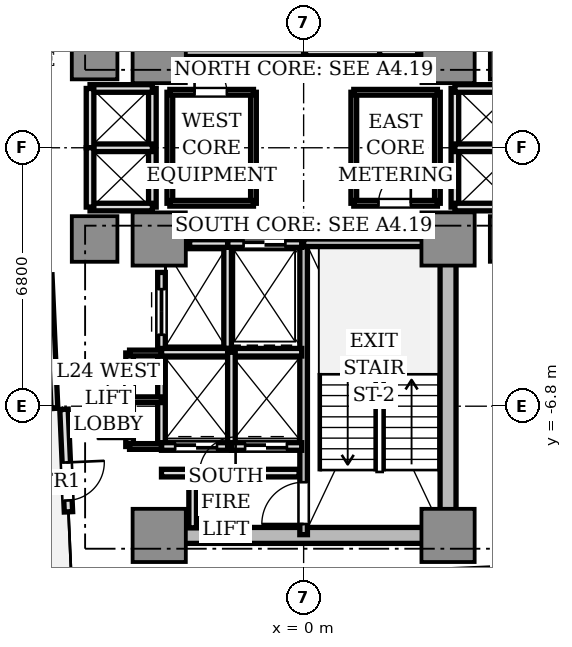
"""IFC4 building model, lengths in metres.
Left out: names, types, materials, properties, quantities, classifications, styles, units other than length and angle.
Written with IfcOpenShell. Run it as: python <this file> out.ifc"""

import sys

from ifc_helpers import new_model, si_unit, direction, frame, frame_2d, origin, origin_2d, place, context, subcontext, project, spatial, rectangle, extrude, source, transform, mapped, element, fill, save


model = new_model("IFC4")
c1 = context("Model", 3, precision=1e-05, world=origin(), true_north=direction((0.0, 1.0)))
c2 = subcontext(c1, "Body", "Model", "MODEL_VIEW")
j1 = project(units=[si_unit("LENGTHUNIT", "METRE"), si_unit("PLANEANGLEUNIT", "RADIAN")], contexts=[c1])
p1 = place(None, origin())
s1 = spatial("IfcSite", under=j1, at=p1, CompositionType="ELEMENT")
p2 = place(p1, origin())
s2 = spatial("IfcBuilding", under=s1, at=p2, CompositionType="ELEMENT")
p3 = place(p2, frame((0.0, 0.0, 90.2)))
s3 = spatial("IfcBuildingStorey", under=s2, at=p3, CompositionType="ELEMENT", Elevation=90.2)
p4 = place(p3, frame((-3.55, -10.2, 0.0), z_axis=(0.0, 0.0, 1.0), x_axis=(1.0, 0.0, 0.0)))
e1 = element("IfcWall", 1, at=p4, inside=s3, PredefinedType="SHEAR", context=c2, shape_type="SweptSolid", body=[
    extrude(rectangle(XDim=7.1, YDim=0.42, at=frame_2d((3.55, 0.0))), origin(), (0.0, 0.0, 1.0), 3.11),
])
p5 = place(p3, frame((3.8, -9.75, 0.0), z_axis=(0.0, 0.0, 1.0), x_axis=(0.0, 1.0, 0.0)))
e2 = element("IfcWall", 2, at=p5, inside=s3, PredefinedType="SHEAR", context=c2, shape_type="SweptSolid", body=[
    extrude(rectangle(XDim=6.9, YDim=0.42, at=frame_2d((3.45, 0.0))), origin(), (0.0, 0.0, 1.0), 3.11),
])
m1 = source(origin(), c2, "Body", "SweptSolid", [
    extrude(rectangle(XDim=1.4, YDim=1.4, at=origin_2d()), origin(), (0.0, 0.0, 1.0), 3.11),
])
for number, where, z_axis, x_axis in (
    (3, (-3.8, 2.4, 0.0), (0.0, 0.0, 1.0), (1.0, 0.0, 0.0)),
    (4, (3.8, 2.4, 0.0), (0.0, 0.0, 1.0), (1.0, 0.0, 0.0)),
    (5, (-3.8, -2.4, 0.0), (0.0, 0.0, 1.0), (1.0, 0.0, 0.0)),
    (6, (3.8, -2.4, 0.0), (0.0, 0.0, 1.0), (1.0, 0.0, 0.0)),
    (7, (-3.8, -10.2, 0.0), (0.0, 0.0, 1.0), (1.0, 0.0, 0.0)),
    (8, (3.8, -10.2, 0.0), (0.0, 0.0, 1.0), (1.0, 0.0, 0.0)),
):
    element("IfcColumn", number, at=place(p3, frame(where, z_axis=z_axis, x_axis=x_axis)), inside=s3, PredefinedType="COLUMN", context=c2, shape_type="MappedRepresentation", body=[
        mapped(m1, transform((0.0, 0.0, 0.0), scale=1.0)),
    ])
m2 = source(origin(), c2, "Body", "SweptSolid", [
    extrude(rectangle(XDim=1.2, YDim=1.2, at=origin_2d()), origin(), (0.0, 0.0, 1.0), 3.11),
])
for number, where, z_axis, x_axis in (
    (9, (5.5, 2.4, 0.0), (0.0, 0.0, 1.0), (1.0, 0.0, 0.0)),
    (10, (-5.5, 2.4, 0.0), (0.0, 0.0, 1.0), (1.0, 0.0, 0.0)),
    (11, (5.5, -2.4, 0.0), (0.0, 0.0, 1.0), (1.0, 0.0, 0.0)),
    (12, (-5.5, -2.4, 0.0), (0.0, 0.0, 1.0), (1.0, 0.0, 0.0)),
):
    element("IfcColumn", number, at=place(p3, frame(where, z_axis=z_axis, x_axis=x_axis)), inside=s3, PredefinedType="COLUMN", context=c2, shape_type="MappedRepresentation", body=[
        mapped(m2, transform((0.0, 0.0, 0.0), scale=1.0)),
    ])
p6 = place(p3, frame((-6.306, -6.882, 0.0), z_axis=(0.0, 0.0, 1.0), x_axis=(0.043672655174, -0.999045894436, 0.0)))
e13 = element("IfcWall", 13, at=p6, inside=s3, PredefinedType="STANDARD", context=c2, shape_type="SweptSolid", body=[
    extrude(rectangle(XDim=2.7, YDim=0.22, at=frame_2d((1.35, 0.0))), origin(), (0.0, 0.0, 1.0), 3.11),
])
p7 = place(p6, frame((1.4, 0.0, 0.0)))
e14 = element("IfcOpeningElement", 14, at=p7, cuts=e13, PredefinedType="OPENING", context=c2, shape_type="SweptSolid", body=[
    extrude(rectangle(XDim=1.0, YDim=2.2, at=frame_2d((0.5, 1.1))), frame((0.0, 0.12, 0.0), z_axis=(0.0, -1.0, 0.0), x_axis=(1.0, 0.0, 0.0)), (0.0, 0.0, 1.0), 0.24),
])
p8 = place(p3, frame((0.0, 2.5, 0.0), z_axis=(0.0, 0.0, 1.0), x_axis=(0.0, 1.0, 0.0)))
e15 = element("IfcWall", 15, at=p8, inside=s3, PredefinedType="SOLIDWALL", context=c2, shape_type="SweptSolid", body=[
    extrude(rectangle(XDim=7.68, YDim=0.2, at=frame_2d((3.84, 0.0))), origin(), (0.0, 0.0, 1.0), 3.11),
])
p9 = place(p8, frame((6.36, 0.0, 0.0)))
e16 = element("IfcOpeningElement", 16, at=p9, cuts=e15, PredefinedType="OPENING", context=c2, shape_type="SweptSolid", body=[
    extrude(rectangle(XDim=1.1, YDim=2.15, at=frame_2d((0.55, 1.075))), frame((0.0, 0.11, 0.0), z_axis=(0.0, -1.0, 0.0), x_axis=(1.0, 0.0, 0.0)), (0.0, 0.0, 1.0), 0.22),
])
p10 = place(p3, frame((-3.72, 2.5, 0.0), z_axis=(0.0, 0.0, 1.0), x_axis=(1.0, 0.0, 0.0)))
e17 = element("IfcWall", 17, at=p10, inside=s3, PredefinedType="SOLIDWALL", context=c2, shape_type="SweptSolid", body=[
    extrude(rectangle(XDim=3.72, YDim=0.2, at=frame_2d((1.86, 0.0))), origin(), (0.0, 0.0, 1.0), 3.11),
])
p11 = place(p3, frame((0.0, -10.18, 0.0), z_axis=(0.0, 0.0, 1.0), x_axis=(0.0, 1.0, 0.0)))
e18 = element("IfcWall", 18, at=p11, inside=s3, PredefinedType="SOLIDWALL", context=c2, shape_type="SweptSolid", body=[
    extrude(rectangle(XDim=7.68, YDim=0.2, at=frame_2d((3.84, 0.0))), origin(), (0.0, 0.0, 1.0), 3.11),
])
p12 = place(p11, frame((0.28, 0.0, 0.0)))
e19 = element("IfcOpeningElement", 19, at=p12, cuts=e18, PredefinedType="OPENING", context=c2, shape_type="SweptSolid", body=[
    extrude(rectangle(XDim=1.1, YDim=2.15, at=frame_2d((0.55, 1.075))), frame((0.0, 0.11, 0.0), z_axis=(0.0, -1.0, 0.0), x_axis=(1.0, 0.0, 0.0)), (0.0, 0.0, 1.0), 0.22),
])
p13 = place(p3, frame((0.0, -2.5, 0.0), z_axis=(0.0, 0.0, 1.0), x_axis=(1.0, 0.0, 0.0)))
e20 = element("IfcWall", 20, at=p13, inside=s3, PredefinedType="SOLIDWALL", context=c2, shape_type="SweptSolid", body=[
    extrude(rectangle(XDim=3.72, YDim=0.2, at=frame_2d((1.86, 0.0))), origin(), (0.0, 0.0, 1.0), 3.11),
])
p14 = place(p3, frame((2.0, 2.5, 0.0), z_axis=(0.0, 0.0, 1.0), x_axis=(0.0, 1.0, 0.0)))
e21 = element("IfcWall", 21, at=p14, inside=s3, PredefinedType="SOLIDWALL", context=c2, shape_type="SweptSolid", body=[
    extrude(rectangle(XDim=2.78, YDim=0.2, at=frame_2d((1.39, 0.0))), origin(), (0.0, 0.0, 1.0), 2.66),
])
p15 = place(p3, frame((0.05, 2.52, 0.0), z_axis=(0.0, 0.0, 1.0), x_axis=(1.0, 0.0, 0.0)))
e22 = element("IfcWall", 22, at=p15, inside=s3, PredefinedType="SOLIDWALL", context=c2, shape_type="SweptSolid", body=[
    extrude(rectangle(XDim=1.95, YDim=0.2, at=frame_2d((0.975, 0.0))), origin(), (0.0, 0.0, 1.0), 2.66),
])
p16 = place(p3, frame((-2.0, -5.28, 0.0), z_axis=(0.0, 0.0, 1.0), x_axis=(0.0, 1.0, 0.0)))
e23 = element("IfcWall", 23, at=p16, inside=s3, PredefinedType="SOLIDWALL", context=c2, shape_type="SweptSolid", body=[
    extrude(rectangle(XDim=2.78, YDim=0.2, at=frame_2d((1.39, 0.0))), origin(), (0.0, 0.0, 1.0), 2.66),
])
p17 = place(p3, frame((-2.0, -2.52, 0.0), z_axis=(0.0, 0.0, 1.0), x_axis=(1.0, 0.0, 0.0)))
e24 = element("IfcWall", 24, at=p17, inside=s3, PredefinedType="SOLIDWALL", context=c2, shape_type="SweptSolid", body=[
    extrude(rectangle(XDim=1.95, YDim=0.2, at=frame_2d((0.975, 0.0))), origin(), (0.0, 0.0, 1.0), 2.66),
])
p18 = place(p17, frame((0.42, 0.0, 0.0)))
e25 = element("IfcOpeningElement", 25, at=p18, cuts=e24, PredefinedType="OPENING", context=c2, shape_type="SweptSolid", body=[
    extrude(rectangle(XDim=1.1, YDim=2.2, at=frame_2d((0.55, 1.1))), frame((0.0, 0.11, 0.0), z_axis=(0.0, -1.0, 0.0), x_axis=(1.0, 0.0, 0.0)), (0.0, 0.0, 1.0), 0.22),
])
for number, where, z_axis, x_axis in (
    (26, (2.0, 2.52, 0.0), (0.0, 0.0, 1.0), (1.0, 0.0, 0.0)),
    (27, (-3.0, -2.52, 0.0), (0.0, 0.0, 1.0), (1.0, 0.0, 0.0)),
):
    element("IfcWall", number, at=place(p3, frame(where, z_axis=z_axis, x_axis=x_axis)), inside=s3, PredefinedType="SOLIDWALL", context=c2, shape_type="SweptSolid", body=[
        extrude(rectangle(XDim=1.0, YDim=0.2, at=frame_2d((0.5, 0.0))), origin(), (0.0, 0.0, 1.0), 2.66),
    ])
p19 = place(p3, frame((-3.74, -5.36, 0.0), z_axis=(0.0, 0.0, 1.0), x_axis=(0.0, 1.0, 0.0)))
e28 = element("IfcWall", 28, at=p19, inside=s3, PredefinedType="SOLIDWALL", context=c2, shape_type="SweptSolid", body=[
    extrude(rectangle(XDim=2.08, YDim=0.2, at=frame_2d((1.04, 0.0))), origin(), (0.0, 0.0, 1.0), 2.66),
])
p20 = place(p19, frame((0.44, 0.0, 0.0)))
e29 = element("IfcOpeningElement", 29, at=p20, cuts=e28, PredefinedType="OPENING", context=c2, shape_type="SweptSolid", body=[
    extrude(rectangle(XDim=1.2, YDim=2.2, at=frame_2d((0.6, 1.1))), frame((0.0, 0.11, 0.0), z_axis=(0.0, -1.0, 0.0), x_axis=(1.0, 0.0, 0.0)), (0.0, 0.0, 1.0), 0.22),
])
p21 = place(p3, frame((-3.74, -7.86, 0.0), z_axis=(0.0, 0.0, 1.0), x_axis=(0.0, 1.0, 0.0)))
e30 = element("IfcWall", 30, at=p21, inside=s3, PredefinedType="SOLIDWALL", context=c2, shape_type="SweptSolid", body=[
    extrude(rectangle(XDim=2.48, YDim=0.2, at=frame_2d((1.24, 0.0))), origin(), (0.0, 0.0, 1.0), 2.66),
])
p22 = place(p3, frame((-3.74, -7.86, 0.0), z_axis=(0.0, 0.0, 1.0), x_axis=(1.0, 0.0, 0.0)))
e31 = element("IfcWall", 31, at=p22, inside=s3, PredefinedType="SOLIDWALL", context=c2, shape_type="SweptSolid", body=[
    extrude(rectangle(XDim=1.84, YDim=0.2, at=frame_2d((0.92, 0.0))), origin(), (0.0, 0.0, 1.0), 2.66),
])
p23 = place(p22, frame((0.36, 0.0, 0.0)))
e32 = element("IfcOpeningElement", 32, at=p23, cuts=e31, PredefinedType="OPENING", context=c2, shape_type="SweptSolid", body=[
    extrude(rectangle(XDim=1.1, YDim=2.2, at=frame_2d((0.55, 1.1))), frame((0.0, 0.11, 0.0), z_axis=(0.0, -1.0, 0.0), x_axis=(1.0, 0.0, 0.0)), (0.0, 0.0, 1.0), 0.22),
])
p24 = place(p3, frame((-3.74, -5.38, 0.0), z_axis=(0.0, 0.0, 1.0), x_axis=(1.0, 0.0, 0.0)))
e33 = element("IfcWall", 33, at=p24, inside=s3, PredefinedType="SOLIDWALL", context=c2, shape_type="SweptSolid", body=[
    extrude(rectangle(XDim=3.69, YDim=0.2, at=frame_2d((1.845, 0.0))), origin(), (0.0, 0.0, 1.0), 2.66),
])
p25 = place(p3, frame((-1.9, -7.86, 0.0), z_axis=(0.0, 0.0, 1.0), x_axis=(0.0, 1.0, 0.0)))
e34 = element("IfcWall", 34, at=p25, inside=s3, PredefinedType="SOLIDWALL", context=c2, shape_type="SweptSolid", body=[
    extrude(rectangle(XDim=2.48, YDim=0.2, at=frame_2d((1.24, 0.0))), origin(), (0.0, 0.0, 1.0), 2.66),
])
p26 = place(p3, frame((-1.9, -7.86, 0.0), z_axis=(0.0, 0.0, 1.0), x_axis=(1.0, 0.0, 0.0)))
e35 = element("IfcWall", 35, at=p26, inside=s3, PredefinedType="SOLIDWALL", context=c2, shape_type="SweptSolid", body=[
    extrude(rectangle(XDim=1.85, YDim=0.2, at=frame_2d((0.925, 0.0))), origin(), (0.0, 0.0, 1.0), 2.66),
])
p27 = place(p26, frame((0.36, 0.0, 0.0)))
e36 = element("IfcOpeningElement", 36, at=p27, cuts=e35, PredefinedType="OPENING", context=c2, shape_type="SweptSolid", body=[
    extrude(rectangle(XDim=1.1, YDim=2.2, at=frame_2d((0.55, 1.1))), frame((0.0, 0.11, 0.0), z_axis=(0.0, -1.0, 0.0), x_axis=(1.0, 0.0, 0.0)), (0.0, 0.0, 1.0), 0.22),
])
p28 = place(p3, frame((3.98, -1.56, 0.0), z_axis=(0.0, 0.0, 1.0), x_axis=(0.0, 1.0, 0.0)))
e37 = element("IfcWall", 37, at=p28, inside=s3, PredefinedType="SOLIDWALL", context=c2, shape_type="SweptSolid", body=[
    extrude(rectangle(XDim=3.12, YDim=0.2, at=frame_2d((1.56, 0.0))), origin(), (0.0, 0.0, 1.0), 2.28),
])
for number, where, z_axis, x_axis in (
    (38, (3.98, 1.56, 0.0), (0.0, 0.0, 1.0), (1.0, 0.0, 0.0)),
    (39, (3.98, -1.56, 0.0), (0.0, 0.0, 1.0), (1.0, 0.0, 0.0)),
    (40, (3.98, 0.0, 0.0), (0.0, 0.0, 1.0), (1.0, 0.0, 0.0)),
):
    element("IfcWall", number, at=place(p3, frame(where, z_axis=z_axis, x_axis=x_axis)), inside=s3, PredefinedType="SOLIDWALL", context=c2, shape_type="SweptSolid", body=[
        extrude(rectangle(XDim=1.64, YDim=0.2, at=frame_2d((0.82, 0.0))), origin(), (0.0, 0.0, 1.0), 2.66),
    ])
p29 = place(p3, frame((-3.98, -1.56, 0.0), z_axis=(0.0, 0.0, 1.0), x_axis=(0.0, 1.0, 0.0)))
e41 = element("IfcWall", 41, at=p29, inside=s3, PredefinedType="SOLIDWALL", context=c2, shape_type="SweptSolid", body=[
    extrude(rectangle(XDim=3.12, YDim=0.2, at=frame_2d((1.56, 0.0))), origin(), (0.0, 0.0, 1.0), 2.28),
])
for number, where, z_axis, x_axis in (
    (42, (-5.62, 1.56, 0.0), (0.0, 0.0, 1.0), (1.0, 0.0, 0.0)),
    (43, (-5.62, -1.56, 0.0), (0.0, 0.0, 1.0), (1.0, 0.0, 0.0)),
    (44, (-5.62, 0.0, 0.0), (0.0, 0.0, 1.0), (1.0, 0.0, 0.0)),
):
    element("IfcWall", number, at=place(p3, frame(where, z_axis=z_axis, x_axis=x_axis)), inside=s3, PredefinedType="SOLIDWALL", context=c2, shape_type="SweptSolid", body=[
        extrude(rectangle(XDim=1.64, YDim=0.2, at=frame_2d((0.82, 0.0))), origin(), (0.0, 0.0, 1.0), 2.66),
    ])
for number, where, z_axis, x_axis in (
    (45, (-5.62, 0.0, 0.0), (0.0, 0.0, 1.0), (0.0, 1.0, 0.0)),
    (46, (-5.62, -1.56, 0.0), (0.0, 0.0, 1.0), (0.0, 1.0, 0.0)),
):
    element("IfcWall", number, at=place(p3, frame(where, z_axis=z_axis, x_axis=x_axis)), inside=s3, PredefinedType="SOLIDWALL", context=c2, shape_type="SweptSolid", body=[
        extrude(rectangle(XDim=1.56, YDim=0.2, at=frame_2d((0.78, 0.0))), origin(), (0.0, 0.0, 1.0), 2.66),
    ])
p30 = place(p3, frame((-3.74, -8.56, 0.0), z_axis=(0.0, 0.0, 1.0), x_axis=(1.0, 0.0, 0.0)))
e47 = element("IfcWall", 47, at=p30, inside=s3, PredefinedType="SOLIDWALL", context=c2, shape_type="SweptSolid", body=[
    extrude(rectangle(XDim=3.62, YDim=0.2, at=frame_2d((1.81, 0.0))), origin(), (0.0, 0.0, 1.0), 2.66),
])
p31 = place(p30, frame((1.0, 0.0, 0.0)))
e48 = element("IfcOpeningElement", 48, at=p31, cuts=e47, PredefinedType="OPENING", context=c2, shape_type="SweptSolid", body=[
    extrude(rectangle(XDim=0.95, YDim=2.15, at=frame_2d((0.475, 1.075))), frame((0.0, 0.11, 0.0), z_axis=(0.0, -1.0, 0.0), x_axis=(1.0, 0.0, 0.0)), (0.0, 0.0, 1.0), 0.22),
])
p32 = place(p3, frame((-2.92, -10.0, 0.0), z_axis=(0.0, 0.0, 1.0), x_axis=(0.0, 1.0, 0.0)))
e49 = element("IfcWall", 49, at=p32, inside=s3, PredefinedType="SOLIDWALL", context=c2, shape_type="SweptSolid", body=[
    extrude(rectangle(XDim=1.44, YDim=0.2, at=frame_2d((0.72, 0.0))), origin(), (0.0, 0.0, 1.0), 2.66),
])
p33 = place(p3, frame((-4.58, -7.86, 0.0), z_axis=(0.0, 0.0, 1.0), x_axis=(0.0, 1.0, 0.0)))
e50 = element("IfcWall", 50, at=p33, inside=s3, PredefinedType="SOLIDWALL", context=c2, shape_type="SweptSolid", body=[
    extrude(rectangle(XDim=2.46, YDim=0.2, at=frame_2d((1.23, 0.0))), origin(), (0.0, 0.0, 1.0), 2.66),
])
p34 = place(p33, frame((0.2, 0.0, 0.0)))
e51 = element("IfcOpeningElement", 51, at=p34, cuts=e50, PredefinedType="OPENING", context=c2, shape_type="SweptSolid", body=[
    extrude(rectangle(XDim=0.85, YDim=2.1, at=frame_2d((0.425, 1.05))), frame((0.0, 0.11, 0.0), z_axis=(0.0, -1.0, 0.0), x_axis=(1.0, 0.0, 0.0)), (0.0, 0.0, 1.0), 0.22),
])
p35 = place(p33, frame((1.38, 0.0, 0.0)))
e52 = element("IfcOpeningElement", 52, at=p35, cuts=e50, PredefinedType="OPENING", context=c2, shape_type="SweptSolid", body=[
    extrude(rectangle(XDim=0.85, YDim=2.1, at=frame_2d((0.425, 1.05))), frame((0.0, 0.11, 0.0), z_axis=(0.0, -1.0, 0.0), x_axis=(1.0, 0.0, 0.0)), (0.0, 0.0, 1.0), 0.22),
])
for number, where, z_axis, x_axis in (
    (53, (-4.58, -5.4, 0.0), (0.0, 0.0, 1.0), (1.0, 0.0, 0.0)),
    (54, (-4.58, -7.86, 0.0), (0.0, 0.0, 1.0), (1.0, 0.0, 0.0)),
    (55, (-4.58, -6.63, 0.0), (0.0, 0.0, 1.0), (1.0, 0.0, 0.0)),
):
    element("IfcWall", number, at=place(p3, frame(where, z_axis=z_axis, x_axis=x_axis)), inside=s3, PredefinedType="PARTITIONING", context=c2, shape_type="SweptSolid", body=[
        extrude(rectangle(XDim=0.84, YDim=0.15, at=frame_2d((0.42, 0.0))), origin(), (0.0, 0.0, 1.0), 2.66),
    ])
p36 = place(p3, frame((-1.32, -1.46, 0.0), z_axis=(0.0, 0.0, 1.0), x_axis=(0.0, 1.0, 0.0)))
e56 = element("IfcWall", 56, at=p36, inside=s3, PredefinedType="PARTITIONING", context=c2, shape_type="SweptSolid", body=[
    extrude(rectangle(XDim=2.92, YDim=0.15, at=frame_2d((1.46, 0.0))), origin(), (0.0, 0.0, 1.0), 2.66),
])
p37 = place(p3, frame((-3.52, -1.46, 0.0), z_axis=(0.0, 0.0, 1.0), x_axis=(0.0, 1.0, 0.0)))
e57 = element("IfcWall", 57, at=p37, inside=s3, PredefinedType="PARTITIONING", context=c2, shape_type="SweptSolid", body=[
    extrude(rectangle(XDim=2.92, YDim=0.15, at=frame_2d((1.46, 0.0))), origin(), (0.0, 0.0, 1.0), 2.28),
])
p38 = place(p3, frame((-3.52, 1.46, 0.0), z_axis=(0.0, 0.0, 1.0), x_axis=(1.0, 0.0, 0.0)))
e58 = element("IfcWall", 58, at=p38, inside=s3, PredefinedType="PARTITIONING", context=c2, shape_type="SweptSolid", body=[
    extrude(rectangle(XDim=2.2, YDim=0.15, at=frame_2d((1.1, 0.0))), origin(), (0.0, 0.0, 1.0), 2.66),
])
p39 = place(p38, frame((0.65, 0.0, 0.0)))
e59 = element("IfcOpeningElement", 59, at=p39, cuts=e58, PredefinedType="OPENING", context=c2, shape_type="SweptSolid", body=[
    extrude(rectangle(XDim=0.85, YDim=2.1, at=frame_2d((0.425, 1.05))), frame((0.0, 0.085, 0.0), z_axis=(0.0, -1.0, 0.0), x_axis=(1.0, 0.0, 0.0)), (0.0, 0.0, 1.0), 0.17),
])
p40 = place(p3, frame((-3.52, -1.46, 0.0), z_axis=(0.0, 0.0, 1.0), x_axis=(1.0, 0.0, 0.0)))
e60 = element("IfcWall", 60, at=p40, inside=s3, PredefinedType="PARTITIONING", context=c2, shape_type="SweptSolid", body=[
    extrude(rectangle(XDim=2.2, YDim=0.15, at=frame_2d((1.1, 0.0))), origin(), (0.0, 0.0, 1.0), 2.66),
])
p41 = place(p3, frame((1.32, -1.46, 0.0), z_axis=(0.0, 0.0, 1.0), x_axis=(0.0, 1.0, 0.0)))
e61 = element("IfcWall", 61, at=p41, inside=s3, PredefinedType="PARTITIONING", context=c2, shape_type="SweptSolid", body=[
    extrude(rectangle(XDim=2.92, YDim=0.15, at=frame_2d((1.46, 0.0))), origin(), (0.0, 0.0, 1.0), 2.66),
])
p42 = place(p3, frame((3.52, -1.46, 0.0), z_axis=(0.0, 0.0, 1.0), x_axis=(0.0, 1.0, 0.0)))
e62 = element("IfcWall", 62, at=p42, inside=s3, PredefinedType="PARTITIONING", context=c2, shape_type="SweptSolid", body=[
    extrude(rectangle(XDim=2.92, YDim=0.15, at=frame_2d((1.46, 0.0))), origin(), (0.0, 0.0, 1.0), 2.28),
])
p43 = place(p3, frame((1.32, 1.46, 0.0), z_axis=(0.0, 0.0, 1.0), x_axis=(1.0, 0.0, 0.0)))
e63 = element("IfcWall", 63, at=p43, inside=s3, PredefinedType="PARTITIONING", context=c2, shape_type="SweptSolid", body=[
    extrude(rectangle(XDim=2.2, YDim=0.15, at=frame_2d((1.1, 0.0))), origin(), (0.0, 0.0, 1.0), 2.66),
])
p44 = place(p3, frame((1.32, -1.46, 0.0), z_axis=(0.0, 0.0, 1.0), x_axis=(1.0, 0.0, 0.0)))
e64 = element("IfcWall", 64, at=p44, inside=s3, PredefinedType="PARTITIONING", context=c2, shape_type="SweptSolid", body=[
    extrude(rectangle(XDim=2.2, YDim=0.15, at=frame_2d((1.1, 0.0))), origin(), (0.0, 0.0, 1.0), 2.66),
])
p45 = place(p44, frame((0.65, 0.0, 0.0)))
e65 = element("IfcOpeningElement", 65, at=p45, cuts=e64, PredefinedType="OPENING", context=c2, shape_type="SweptSolid", body=[
    extrude(rectangle(XDim=0.85, YDim=2.1, at=frame_2d((0.425, 1.05))), frame((0.0, 0.085, 0.0), z_axis=(0.0, -1.0, 0.0), x_axis=(1.0, 0.0, 0.0)), (0.0, 0.0, 1.0), 0.17),
])
p46 = place(p3, frame((-6.71, -3.346, 0.0), z_axis=(0.0, 0.0, 1.0), x_axis=(0.043597663116, -0.999049169846, 0.0)))
e66 = element("IfcWall", 66, at=p46, inside=s3, PredefinedType="PARTITIONING", context=c2, shape_type="SweptSolid", body=[
    extrude(rectangle(XDim=3.5, YDim=0.18, at=frame_2d((1.75, 0.0))), origin(), (0.0, 0.0, 1.0), 2.66),
])
m3 = source(origin(), c2, "Body", "SweptSolid", [
    extrude(rectangle(XDim=1.0, YDim=0.05, at=origin_2d()), origin(), (0.0, 0.0, 1.0), 2.2),
])
p47 = place(p7, frame((0.5, 0.0, 0.0)))
e67 = element("IfcDoor", 67, at=p47, inside=s3, OperationType="SINGLE_SWING_LEFT", PredefinedType="DOOR", context=c2, shape_type="MappedRepresentation", body=[
    mapped(m3, transform((0.0, 0.0, 0.0), scale=1.0)),
])
fill(e14, e67)
m4 = source(origin(), c2, "Body", "SweptSolid", [
    extrude(rectangle(XDim=1.1, YDim=0.05, at=origin_2d()), origin(), (0.0, 0.0, 1.0), 2.2),
])
p48 = place(p18, frame((0.55, 0.0, 0.0)))
e68 = element("IfcDoor", 68, at=p48, inside=s3, OperationType="DOUBLE_DOOR_SLIDING", PredefinedType="DOOR", context=c2, shape_type="MappedRepresentation", body=[
    mapped(m4, transform((0.0, 0.0, 0.0), scale=1.0)),
])
fill(e25, e68)
m5 = source(origin(), c2, "Body", "SweptSolid", [
    extrude(rectangle(XDim=1.2, YDim=0.05, at=origin_2d()), origin(), (0.0, 0.0, 1.0), 2.2),
])
p49 = place(p20, frame((0.6, 0.0, 0.0)))
e69 = element("IfcDoor", 69, at=p49, inside=s3, OperationType="DOUBLE_DOOR_SLIDING", PredefinedType="DOOR", context=c2, shape_type="MappedRepresentation", body=[
    mapped(m5, transform((0.0, 0.0, 0.0), scale=1.0)),
])
fill(e29, e69)
p50 = place(p23, frame((0.55, 0.0, 0.0)))
e70 = element("IfcDoor", 70, at=p50, inside=s3, OperationType="DOUBLE_DOOR_SLIDING", PredefinedType="DOOR", context=c2, shape_type="MappedRepresentation", body=[
    mapped(m4, transform((0.0, 0.0, 0.0), scale=1.0)),
])
fill(e32, e70)
p51 = place(p27, frame((0.55, 0.0, 0.0)))
e71 = element("IfcDoor", 71, at=p51, inside=s3, OperationType="DOUBLE_DOOR_SLIDING", PredefinedType="DOOR", context=c2, shape_type="MappedRepresentation", body=[
    mapped(m4, transform((0.0, 0.0, 0.0), scale=1.0)),
])
fill(e36, e71)
m6 = source(origin(), c2, "Body", "SweptSolid", [
    extrude(rectangle(XDim=1.1, YDim=0.05, at=origin_2d()), origin(), (0.0, 0.0, 1.0), 2.15),
])
p52 = place(p12, frame((0.55, 0.0, 0.0)))
e72 = element("IfcDoor", 72, at=p52, inside=s3, OperationType="SINGLE_SWING_LEFT", PredefinedType="DOOR", context=c2, shape_type="MappedRepresentation", body=[
    mapped(m6, transform((0.0, 0.0, 0.0), scale=1.0)),
])
fill(e19, e72)
m7 = source(origin(), c2, "Body", "SweptSolid", [
    extrude(rectangle(XDim=0.95, YDim=0.05, at=origin_2d()), origin(), (0.0, 0.0, 1.0), 2.15),
])
p53 = place(p31, frame((0.475, 0.0, 0.0)))
e73 = element("IfcDoor", 73, at=p53, inside=s3, OperationType="SINGLE_SWING_RIGHT", PredefinedType="DOOR", context=c2, shape_type="MappedRepresentation", body=[
    mapped(m7, transform((0.0, 0.0, 0.0), scale=1.0)),
])
fill(e48, e73)
m8 = source(origin(), c2, "Body", "SweptSolid", [
    extrude(rectangle(XDim=0.85, YDim=0.05, at=origin_2d()), origin(), (0.0, 0.0, 1.0), 2.1),
])
p54 = place(p34, frame((0.425, 0.0, 0.0)))
e74 = element("IfcDoor", 74, at=p54, inside=s3, OperationType="SINGLE_SWING_LEFT", PredefinedType="DOOR", context=c2, shape_type="MappedRepresentation", body=[
    mapped(m8, transform((0.0, 0.0, 0.0), scale=1.0)),
])
fill(e51, e74)
p55 = place(p35, frame((0.425, 0.0, 0.0)))
e75 = element("IfcDoor", 75, at=p55, inside=s3, OperationType="SINGLE_SWING_RIGHT", PredefinedType="DOOR", context=c2, shape_type="MappedRepresentation", body=[
    mapped(m8, transform((0.0, 0.0, 0.0), scale=1.0)),
])
fill(e52, e75)
p56 = place(p39, frame((0.425, 0.0, 0.0)))
e76 = element("IfcDoor", 76, at=p56, inside=s3, OperationType="SINGLE_SWING_LEFT", PredefinedType="DOOR", context=c2, shape_type="MappedRepresentation", body=[
    mapped(m8, transform((0.0, 0.0, 0.0), scale=1.0)),
])
fill(e59, e76)
p57 = place(p45, frame((0.425, 0.0, 0.0)))
e77 = element("IfcDoor", 77, at=p57, inside=s3, OperationType="SINGLE_SWING_RIGHT", PredefinedType="DOOR", context=c2, shape_type="MappedRepresentation", body=[
    mapped(m8, transform((0.0, 0.0, 0.0), scale=1.0)),
])
fill(e65, e77)
save(model, sys.argv[1])
